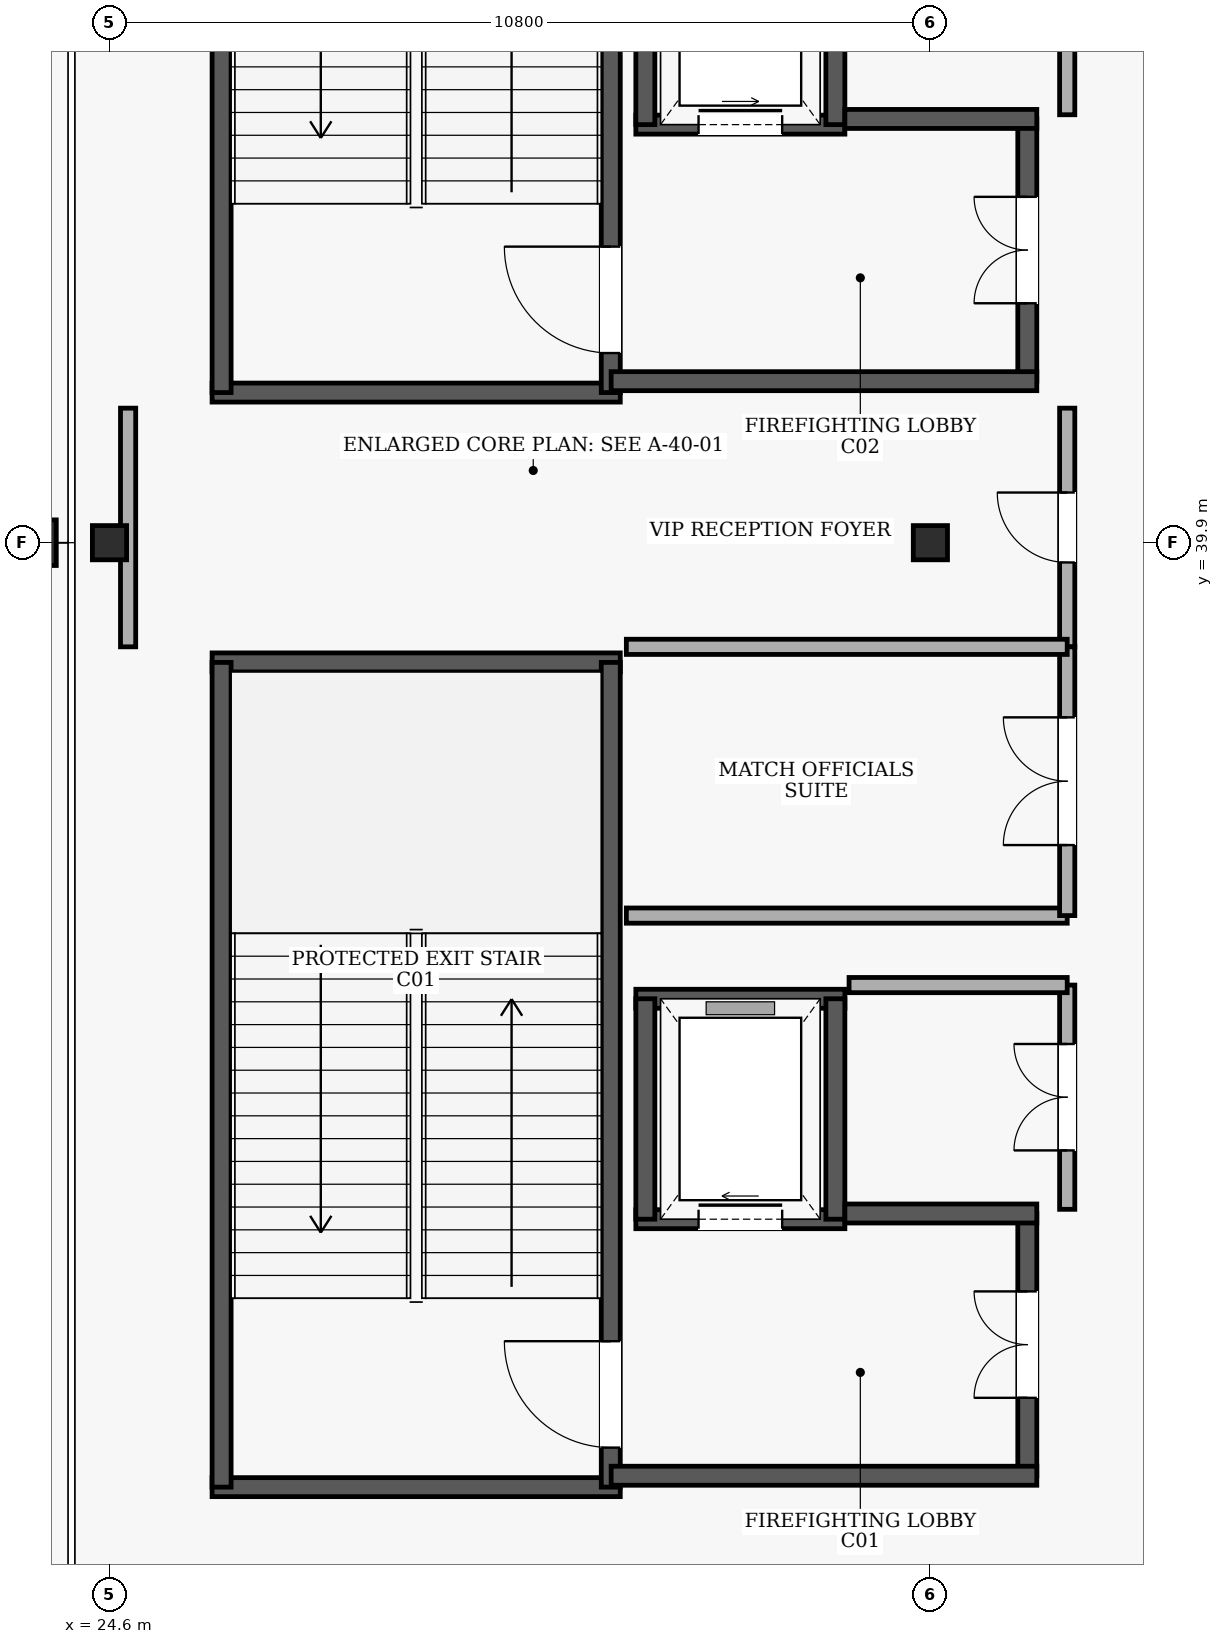
"""IFC4 building model, lengths in metres.
Left out: names, types, materials, properties, quantities, classifications, styles, units other than length and angle.
Written with IfcOpenShell. Run it as: python <this file> out.ifc"""

import sys

from ifc_helpers import new_model, si_unit, direction, frame, frame_2d, origin, origin_2d, place, context, subcontext, project, spatial, rectangle, extrude, element, fill, save


model = new_model("IFC4")
c1 = context("Model", 3, precision=1e-05, world=origin(), true_north=direction((0.0, 1.0)))
c2 = subcontext(c1, "Body", "Model", "MODEL_VIEW")
j1 = project(units=[si_unit("LENGTHUNIT", "METRE"), si_unit("PLANEANGLEUNIT", "RADIAN")], contexts=[c1])
p1 = place(None, origin())
s1 = spatial("IfcSite", under=j1, at=p1, CompositionType="ELEMENT")
p2 = place(p1, origin())
s2 = spatial("IfcBuilding", under=s1, at=p2, CompositionType="ELEMENT")
p3 = place(p2, origin())
s3 = spatial("IfcBuildingStorey", under=s2, at=p3, CompositionType="ELEMENT", Elevation=0.0)
p4 = place(p3, frame((23.6, 39.9, 0.0), z_axis=(0.0, 0.0, 1.0), x_axis=(1.0, 0.0, 0.0)))
e1 = element("IfcColumn", 1, at=p4, inside=s3, PredefinedType="COLUMN", context=c2, shape_type="SweptSolid", body=[
    extrude(rectangle(XDim=0.6, YDim=0.6, at=origin_2d()), origin(), (0.0, 0.0, 1.0), 5.4),
])
for number, where, z_axis, x_axis in (
    (2, (24.6, 39.9, 0.0), (0.0, 0.0, 1.0), (1.0, 0.0, 0.0)),
    (3, (35.4, 39.9, 0.0), (0.0, 0.0, 1.0), (1.0, 0.0, 0.0)),
):
    element("IfcColumn", number, at=place(p3, frame(where, z_axis=z_axis, x_axis=x_axis)), inside=s3, PredefinedType="COLUMN", context=c2, shape_type="SweptSolid", body=[
        extrude(rectangle(XDim=0.45, YDim=0.45, at=origin_2d()), origin(), (0.0, 0.0, 1.0), 5.4),
    ])
for number, where, z_axis, x_axis in (
    (4, (25.95, 27.475, 0.0), (0.0, 0.0, 1.0), (1.0, 0.0, 0.0)),
    (5, (31.32, 38.325, 0.0), (0.0, 0.0, 1.0), (-1.0, 0.0, 0.0)),
):
    element("IfcWall", number, at=place(p3, frame(where, z_axis=z_axis, x_axis=x_axis)), inside=s3, PredefinedType="SHEAR", context=c2, shape_type="SweptSolid", body=[
        extrude(rectangle(XDim=5.37, YDim=0.25, at=frame_2d((2.685, 0.0))), origin(), (0.0, 0.0, 1.0), 5.08),
    ])
p5 = place(p3, frame((26.075, 27.475, 0.0), z_axis=(0.0, 0.0, 1.0), x_axis=(0.0, 1.0, 0.0)))
e6 = element("IfcWall", 6, at=p5, inside=s3, PredefinedType="SHEAR", context=c2, shape_type="SweptSolid", body=[
    extrude(rectangle(XDim=10.85, YDim=0.25, at=frame_2d((5.425, 0.0))), origin(), (0.0, 0.0, 1.0), 5.08),
])
p6 = place(p3, frame((31.195, 27.475, 0.0), z_axis=(0.0, 0.0, 1.0), x_axis=(0.0, 1.0, 0.0)))
e7 = element("IfcWall", 7, at=p6, inside=s3, PredefinedType="SHEAR", context=c2, shape_type="SweptSolid", body=[
    extrude(rectangle(XDim=10.85, YDim=0.25, at=frame_2d((5.425, 0.0))), origin(), (0.0, 0.0, 1.0), 5.08),
])
p7 = place(p6, frame((0.52, 0.0, 0.0)))
e8 = element("IfcOpeningElement", 8, at=p7, cuts=e7, PredefinedType="OPENING", context=c2, shape_type="SweptSolid", body=[
    extrude(rectangle(XDim=1.4, YDim=2.15, at=frame_2d((0.7, 1.075))), frame((0.0, 0.135, 0.0), z_axis=(0.0, -1.0, 0.0), x_axis=(1.0, 0.0, 0.0)), (0.0, 0.0, 1.0), 0.27),
])
p8 = place(p3, frame((25.95, 41.875, 0.0), z_axis=(0.0, 0.0, 1.0), x_axis=(1.0, 0.0, 0.0)))
e9 = element("IfcWall", 9, at=p8, inside=s3, PredefinedType="SHEAR", context=c2, shape_type="SweptSolid", body=[
    extrude(rectangle(XDim=5.37, YDim=0.25, at=frame_2d((2.685, 0.0))), origin(), (0.0, 0.0, 1.0), 5.08),
])
p9 = place(p3, frame((26.075, 41.875, 0.0), z_axis=(0.0, 0.0, 1.0), x_axis=(0.0, 1.0, 0.0)))
e10 = element("IfcWall", 10, at=p9, inside=s3, PredefinedType="SHEAR", context=c2, shape_type="SweptSolid", body=[
    extrude(rectangle(XDim=10.85, YDim=0.25, at=frame_2d((5.425, 0.0))), origin(), (0.0, 0.0, 1.0), 5.08),
])
p10 = place(p3, frame((31.195, 41.875, 0.0), z_axis=(0.0, 0.0, 1.0), x_axis=(0.0, 1.0, 0.0)))
e11 = element("IfcWall", 11, at=p10, inside=s3, PredefinedType="SHEAR", context=c2, shape_type="SweptSolid", body=[
    extrude(rectangle(XDim=10.85, YDim=0.25, at=frame_2d((5.425, 0.0))), origin(), (0.0, 0.0, 1.0), 5.08),
])
p11 = place(p10, frame((0.52, 0.0, 0.0)))
e12 = element("IfcOpeningElement", 12, at=p11, cuts=e11, PredefinedType="OPENING", context=c2, shape_type="SweptSolid", body=[
    extrude(rectangle(XDim=1.4, YDim=2.15, at=frame_2d((0.7, 1.075))), frame((0.0, 0.135, 0.0), z_axis=(0.0, -1.0, 0.0), x_axis=(1.0, 0.0, 0.0)), (0.0, 0.0, 1.0), 0.27),
])
p12 = place(p3, frame((31.525, 31.0, 0.0), z_axis=(0.0, 0.0, 1.0), x_axis=(1.0, 0.0, 0.0)))
e13 = element("IfcWall", 13, at=p12, inside=s3, PredefinedType="SHEAR", context=c2, shape_type="SweptSolid", body=[
    extrude(rectangle(XDim=2.75, YDim=0.25, at=frame_2d((1.375, 0.0))), origin(), (0.0, 0.0, 1.0), 5.08),
])
p13 = place(p12, frame((0.825, 0.0, 0.0)))
e14 = element("IfcOpeningElement", 14, at=p13, cuts=e13, PredefinedType="OPENING", context=c2, shape_type="SweptSolid", body=[
    extrude(rectangle(XDim=1.1, YDim=2.15, at=frame_2d((0.55, 1.075))), frame((0.0, 0.135, 0.0), z_axis=(0.0, -1.0, 0.0), x_axis=(1.0, 0.0, 0.0)), (0.0, 0.0, 1.0), 0.27),
])
p14 = place(p3, frame((34.275, 33.9, 0.0), z_axis=(0.0, 0.0, 1.0), x_axis=(-1.0, 0.0, 0.0)))
e15 = element("IfcWall", 15, at=p14, inside=s3, PredefinedType="SHEAR", context=c2, shape_type="SweptSolid", body=[
    extrude(rectangle(XDim=2.75, YDim=0.25, at=frame_2d((1.375, 0.0))), origin(), (0.0, 0.0, 1.0), 5.08),
])
for number, where, z_axis, x_axis in (
    (16, (31.65, 33.9, 0.0), (0.0, 0.0, 1.0), (0.0, -1.0, 0.0)),
    (17, (34.15, 31.0, 0.0), (0.0, 0.0, 1.0), (0.0, 1.0, 0.0)),
):
    element("IfcWall", number, at=place(p3, frame(where, z_axis=z_axis, x_axis=x_axis)), inside=s3, PredefinedType="SHEAR", context=c2, shape_type="SweptSolid", body=[
        extrude(rectangle(XDim=2.9, YDim=0.25, at=frame_2d((1.45, 0.0))), origin(), (0.0, 0.0, 1.0), 5.08),
    ])
p15 = place(p3, frame((36.675, 27.625, 0.0), z_axis=(0.0, 0.0, 1.0), x_axis=(0.0, 1.0, 0.0)))
e18 = element("IfcWall", 18, at=p15, inside=s3, PredefinedType="SHEAR", context=c2, shape_type="SweptSolid", body=[
    extrude(rectangle(XDim=3.45, YDim=0.25, at=frame_2d((1.725, 0.0))), origin(), (0.0, 0.0, 1.0), 5.08),
])
p16 = place(p15, frame((1.025, 0.0, 0.0)))
e19 = element("IfcOpeningElement", 19, at=p16, cuts=e18, PredefinedType="OPENING", context=c2, shape_type="SweptSolid", body=[
    extrude(rectangle(XDim=1.4, YDim=2.15, at=frame_2d((0.7, 1.075))), frame((0.0, 0.135, 0.0), z_axis=(0.0, -1.0, 0.0), x_axis=(1.0, 0.0, 0.0)), (0.0, 0.0, 1.0), 0.27),
])
p17 = place(p3, frame((34.275, 31.075, 0.0), z_axis=(0.0, 0.0, 1.0), x_axis=(1.0, 0.0, 0.0)))
e20 = element("IfcWall", 20, at=p17, inside=s3, PredefinedType="SHEAR", context=c2, shape_type="SweptSolid", body=[
    extrude(rectangle(XDim=2.525, YDim=0.25, at=frame_2d((1.263, 0.0))), origin(), (0.0, 0.0, 1.0), 5.08),
])
p18 = place(p3, frame((31.2, 27.625, 0.0), z_axis=(0.0, 0.0, 1.0), x_axis=(1.0, 0.0, 0.0)))
e21 = element("IfcWall", 21, at=p18, inside=s3, PredefinedType="SHEAR", context=c2, shape_type="SweptSolid", body=[
    extrude(rectangle(XDim=5.6, YDim=0.25, at=frame_2d((2.8, 0.0))), origin(), (0.0, 0.0, 1.0), 5.08),
])
p19 = place(p3, frame((31.525, 45.4, 0.0), z_axis=(0.0, 0.0, 1.0), x_axis=(1.0, 0.0, 0.0)))
e22 = element("IfcWall", 22, at=p19, inside=s3, PredefinedType="SHEAR", context=c2, shape_type="SweptSolid", body=[
    extrude(rectangle(XDim=2.75, YDim=0.25, at=frame_2d((1.375, 0.0))), origin(), (0.0, 0.0, 1.0), 5.08),
])
p20 = place(p19, frame((0.825, 0.0, 0.0)))
e23 = element("IfcOpeningElement", 23, at=p20, cuts=e22, PredefinedType="OPENING", context=c2, shape_type="SweptSolid", body=[
    extrude(rectangle(XDim=1.1, YDim=2.15, at=frame_2d((0.55, 1.075))), frame((0.0, 0.135, 0.0), z_axis=(0.0, -1.0, 0.0), x_axis=(1.0, 0.0, 0.0)), (0.0, 0.0, 1.0), 0.27),
])
for number, where, z_axis, x_axis in (
    (24, (31.65, 48.3, 0.0), (0.0, 0.0, 1.0), (0.0, -1.0, 0.0)),
    (25, (34.15, 45.4, 0.0), (0.0, 0.0, 1.0), (0.0, 1.0, 0.0)),
):
    element("IfcWall", number, at=place(p3, frame(where, z_axis=z_axis, x_axis=x_axis)), inside=s3, PredefinedType="SHEAR", context=c2, shape_type="SweptSolid", body=[
        extrude(rectangle(XDim=2.9, YDim=0.25, at=frame_2d((1.45, 0.0))), origin(), (0.0, 0.0, 1.0), 5.08),
    ])
p21 = place(p3, frame((36.675, 42.025, 0.0), z_axis=(0.0, 0.0, 1.0), x_axis=(0.0, 1.0, 0.0)))
e26 = element("IfcWall", 26, at=p21, inside=s3, PredefinedType="SHEAR", context=c2, shape_type="SweptSolid", body=[
    extrude(rectangle(XDim=3.45, YDim=0.25, at=frame_2d((1.725, 0.0))), origin(), (0.0, 0.0, 1.0), 5.08),
])
p22 = place(p21, frame((1.025, 0.0, 0.0)))
e27 = element("IfcOpeningElement", 27, at=p22, cuts=e26, PredefinedType="OPENING", context=c2, shape_type="SweptSolid", body=[
    extrude(rectangle(XDim=1.4, YDim=2.15, at=frame_2d((0.7, 1.075))), frame((0.0, 0.135, 0.0), z_axis=(0.0, -1.0, 0.0), x_axis=(1.0, 0.0, 0.0)), (0.0, 0.0, 1.0), 0.27),
])
p23 = place(p3, frame((34.275, 45.475, 0.0), z_axis=(0.0, 0.0, 1.0), x_axis=(1.0, 0.0, 0.0)))
e28 = element("IfcWall", 28, at=p23, inside=s3, PredefinedType="SHEAR", context=c2, shape_type="SweptSolid", body=[
    extrude(rectangle(XDim=2.525, YDim=0.25, at=frame_2d((1.263, 0.0))), origin(), (0.0, 0.0, 1.0), 5.08),
])
p24 = place(p3, frame((31.2, 42.025, 0.0), z_axis=(0.0, 0.0, 1.0), x_axis=(1.0, 0.0, 0.0)))
e29 = element("IfcWall", 29, at=p24, inside=s3, PredefinedType="SHEAR", context=c2, shape_type="SweptSolid", body=[
    extrude(rectangle(XDim=5.6, YDim=0.25, at=frame_2d((2.8, 0.0))), origin(), (0.0, 0.0, 1.0), 5.08),
])
p25 = place(p3, frame((37.2, 31.13, 0.0), z_axis=(0.0, 0.0, 1.0), x_axis=(0.0, 1.0, 0.0)))
e30 = element("IfcWall", 30, at=p25, inside=s3, PredefinedType="PARTITIONING", context=c2, shape_type="SweptSolid", body=[
    extrude(rectangle(XDim=2.95, YDim=0.2, at=frame_2d((1.475, 0.0))), origin(), (0.0, 0.0, 1.0), 5.08),
])
p26 = place(p25, frame((0.775, 0.0, 0.0)))
e31 = element("IfcOpeningElement", 31, at=p26, cuts=e30, PredefinedType="OPENING", context=c2, shape_type="SweptSolid", body=[
    extrude(rectangle(XDim=1.4, YDim=2.2, at=frame_2d((0.7, 1.1))), frame((0.0, 0.11, 0.0), z_axis=(0.0, -1.0, 0.0), x_axis=(1.0, 0.0, 0.0)), (0.0, 0.0, 1.0), 0.22),
])
p27 = place(p3, frame((37.2, 34.08, 0.0), z_axis=(0.0, 0.0, 1.0), x_axis=(-1.0, 0.0, 0.0)))
e32 = element("IfcWall", 32, at=p27, inside=s3, PredefinedType="PARTITIONING", context=c2, shape_type="SweptSolid", body=[
    extrude(rectangle(XDim=2.87, YDim=0.2, at=frame_2d((1.435, 0.0))), origin(), (0.0, 0.0, 1.0), 5.08),
])
p28 = place(p3, frame((37.2, 38.53, 0.0), z_axis=(0.0, 0.0, 1.0), x_axis=(0.0, 1.0, 0.0)))
e33 = element("IfcWall", 33, at=p28, inside=s3, PredefinedType="PARTITIONING", context=c2, shape_type="SweptSolid", body=[
    extrude(rectangle(XDim=3.14, YDim=0.2, at=frame_2d((1.57, 0.0))), origin(), (0.0, 0.0, 1.0), 5.08),
])
p29 = place(p28, frame((1.11, 0.0, 0.0)))
e34 = element("IfcOpeningElement", 34, at=p29, cuts=e33, PredefinedType="OPENING", context=c2, shape_type="SweptSolid", body=[
    extrude(rectangle(XDim=0.92, YDim=2.1, at=frame_2d((0.46, 1.05))), frame((0.0, 0.11, 0.0), z_axis=(0.0, -1.0, 0.0), x_axis=(1.0, 0.0, 0.0)), (0.0, 0.0, 1.0), 0.22),
])
p30 = place(p3, frame((24.845, 41.67, 0.0), z_axis=(0.0, 0.0, 1.0), x_axis=(0.0, -1.0, 0.0)))
e35 = element("IfcWall", 35, at=p30, inside=s3, PredefinedType="PARTITIONING", context=c2, shape_type="SweptSolid", body=[
    extrude(rectangle(XDim=3.14, YDim=0.2, at=frame_2d((1.57, 0.0))), origin(), (0.0, 0.0, 1.0), 4.16),
])
p31 = place(p3, frame((31.4, 34.994, 0.0), z_axis=(0.0, 0.0, 1.0), x_axis=(1.0, 0.0, 0.0)))
e36 = element("IfcWall", 36, at=p31, inside=s3, PredefinedType="PARTITIONING", context=c2, shape_type="SweptSolid", body=[
    extrude(rectangle(XDim=5.8, YDim=0.2, at=frame_2d((2.9, 0.0))), origin(), (0.0, 0.0, 1.0), 5.08),
])
p32 = place(p3, frame((37.2, 34.994, 0.0), z_axis=(0.0, 0.0, 1.0), x_axis=(0.0, 1.0, 0.0)))
e37 = element("IfcWall", 37, at=p32, inside=s3, PredefinedType="PARTITIONING", context=c2, shape_type="SweptSolid", body=[
    extrude(rectangle(XDim=3.536, YDim=0.2, at=frame_2d((1.768, 0.0))), origin(), (0.0, 0.0, 1.0), 5.08),
])
p33 = place(p32, frame((0.928, 0.0, 0.0)))
e38 = element("IfcOpeningElement", 38, at=p33, cuts=e37, PredefinedType="OPENING", context=c2, shape_type="SweptSolid", body=[
    extrude(rectangle(XDim=1.68, YDim=2.25, at=frame_2d((0.84, 1.125))), frame((0.0, 0.11, 0.0), z_axis=(0.0, -1.0, 0.0), x_axis=(1.0, 0.0, 0.0)), (0.0, 0.0, 1.0), 0.22),
])
p34 = place(p3, frame((37.2, 38.53, 0.0), z_axis=(0.0, 0.0, 1.0), x_axis=(-1.0, 0.0, 0.0)))
e39 = element("IfcWall", 39, at=p34, inside=s3, PredefinedType="PARTITIONING", context=c2, shape_type="SweptSolid", body=[
    extrude(rectangle(XDim=5.8, YDim=0.2, at=frame_2d((2.9, 0.0))), origin(), (0.0, 0.0, 1.0), 5.08),
])
p35 = place(p3, frame((37.2, 45.53, 0.0), z_axis=(0.0, 0.0, 1.0), x_axis=(0.0, 1.0, 0.0)))
e40 = element("IfcWall", 40, at=p35, inside=s3, PredefinedType="PARTITIONING", context=c2, shape_type="SweptSolid", body=[
    extrude(rectangle(XDim=2.95, YDim=0.2, at=frame_2d((1.475, 0.0))), origin(), (0.0, 0.0, 1.0), 5.08),
])
p36 = place(p35, frame((1.015, 0.0, 0.0)))
e41 = element("IfcOpeningElement", 41, at=p36, cuts=e40, PredefinedType="OPENING", context=c2, shape_type="SweptSolid", body=[
    extrude(rectangle(XDim=0.92, YDim=2.1, at=frame_2d((0.46, 1.05))), frame((0.0, 0.11, 0.0), z_axis=(0.0, -1.0, 0.0), x_axis=(1.0, 0.0, 0.0)), (0.0, 0.0, 1.0), 0.22),
])
p37 = place(p7, frame((1.4, 0.0, 0.0), z_axis=(0.0, 0.0, 1.0), x_axis=(-1.0, 0.0, 0.0)))
e42 = element("IfcDoor", 42, at=p37, inside=s3, OperationType="SINGLE_SWING_LEFT", PredefinedType="DOOR", context=c2, shape_type="SweptSolid", body=[
    extrude(rectangle(XDim=1.4, YDim=2.15, at=frame_2d((0.7, 1.075))), frame((0.0, 0.025, 0.0), z_axis=(0.0, -1.0, 0.0), x_axis=(1.0, 0.0, 0.0)), (0.0, 0.0, 1.0), 0.05),
])
fill(e8, e42)
p38 = place(p11, frame((1.4, 0.0, 0.0), z_axis=(0.0, 0.0, 1.0), x_axis=(-1.0, 0.0, 0.0)))
e43 = element("IfcDoor", 43, at=p38, inside=s3, OperationType="SINGLE_SWING_LEFT", PredefinedType="DOOR", context=c2, shape_type="SweptSolid", body=[
    extrude(rectangle(XDim=1.4, YDim=2.15, at=frame_2d((0.7, 1.075))), frame((0.0, 0.025, 0.0), z_axis=(0.0, -1.0, 0.0), x_axis=(1.0, 0.0, 0.0)), (0.0, 0.0, 1.0), 0.05),
])
fill(e12, e43)
p39 = place(p13, origin())
e44 = element("IfcDoor", 44, at=p39, inside=s3, OperationType="SLIDING_TO_RIGHT", PredefinedType="DOOR", context=c2, shape_type="SweptSolid", body=[
    extrude(rectangle(XDim=1.1, YDim=2.15, at=frame_2d((0.55, 1.075))), frame((0.0, 0.025, 0.0), z_axis=(0.0, -1.0, 0.0), x_axis=(1.0, 0.0, 0.0)), (0.0, 0.0, 1.0), 0.05),
])
fill(e14, e44)
p40 = place(p16, origin())
e45 = element("IfcDoor", 45, at=p40, inside=s3, OperationType="DOUBLE_DOOR_SINGLE_SWING", PredefinedType="DOOR", context=c2, shape_type="SweptSolid", body=[
    extrude(rectangle(XDim=1.4, YDim=2.15, at=frame_2d((0.7, 1.075))), frame((0.0, 0.025, 0.0), z_axis=(0.0, -1.0, 0.0), x_axis=(1.0, 0.0, 0.0)), (0.0, 0.0, 1.0), 0.05),
])
fill(e19, e45)
p41 = place(p20, origin())
e46 = element("IfcDoor", 46, at=p41, inside=s3, OperationType="SLIDING_TO_LEFT", PredefinedType="DOOR", context=c2, shape_type="SweptSolid", body=[
    extrude(rectangle(XDim=1.1, YDim=2.15, at=frame_2d((0.55, 1.075))), frame((0.0, 0.025, 0.0), z_axis=(0.0, -1.0, 0.0), x_axis=(1.0, 0.0, 0.0)), (0.0, 0.0, 1.0), 0.05),
])
fill(e23, e46)
p42 = place(p22, origin())
e47 = element("IfcDoor", 47, at=p42, inside=s3, OperationType="DOUBLE_DOOR_SINGLE_SWING", PredefinedType="DOOR", context=c2, shape_type="SweptSolid", body=[
    extrude(rectangle(XDim=1.4, YDim=2.15, at=frame_2d((0.7, 1.075))), frame((0.0, 0.025, 0.0), z_axis=(0.0, -1.0, 0.0), x_axis=(1.0, 0.0, 0.0)), (0.0, 0.0, 1.0), 0.05),
])
fill(e27, e47)
p43 = place(p26, origin())
e48 = element("IfcDoor", 48, at=p43, inside=s3, OperationType="DOUBLE_DOOR_SINGLE_SWING", PredefinedType="DOOR", context=c2, shape_type="SweptSolid", body=[
    extrude(rectangle(XDim=1.4, YDim=2.2, at=frame_2d((0.7, 1.1))), frame((0.0, 0.025, 0.0), z_axis=(0.0, -1.0, 0.0), x_axis=(1.0, 0.0, 0.0)), (0.0, 0.0, 1.0), 0.05),
])
fill(e31, e48)
p44 = place(p29, origin())
e49 = element("IfcDoor", 49, at=p44, inside=s3, OperationType="SINGLE_SWING_RIGHT", PredefinedType="DOOR", context=c2, shape_type="SweptSolid", body=[
    extrude(rectangle(XDim=0.92, YDim=2.1, at=frame_2d((0.46, 1.05))), frame((0.0, 0.025, 0.0), z_axis=(0.0, -1.0, 0.0), x_axis=(1.0, 0.0, 0.0)), (0.0, 0.0, 1.0), 0.05),
])
fill(e34, e49)
p45 = place(p33, origin())
e50 = element("IfcDoor", 50, at=p45, inside=s3, OperationType="DOUBLE_DOOR_SINGLE_SWING", PredefinedType="DOOR", context=c2, shape_type="SweptSolid", body=[
    extrude(rectangle(XDim=1.68, YDim=2.25, at=frame_2d((0.84, 1.125))), frame((0.0, 0.025, 0.0), z_axis=(0.0, -1.0, 0.0), x_axis=(1.0, 0.0, 0.0)), (0.0, 0.0, 1.0), 0.05),
])
fill(e38, e50)
save(model, sys.argv[1])
